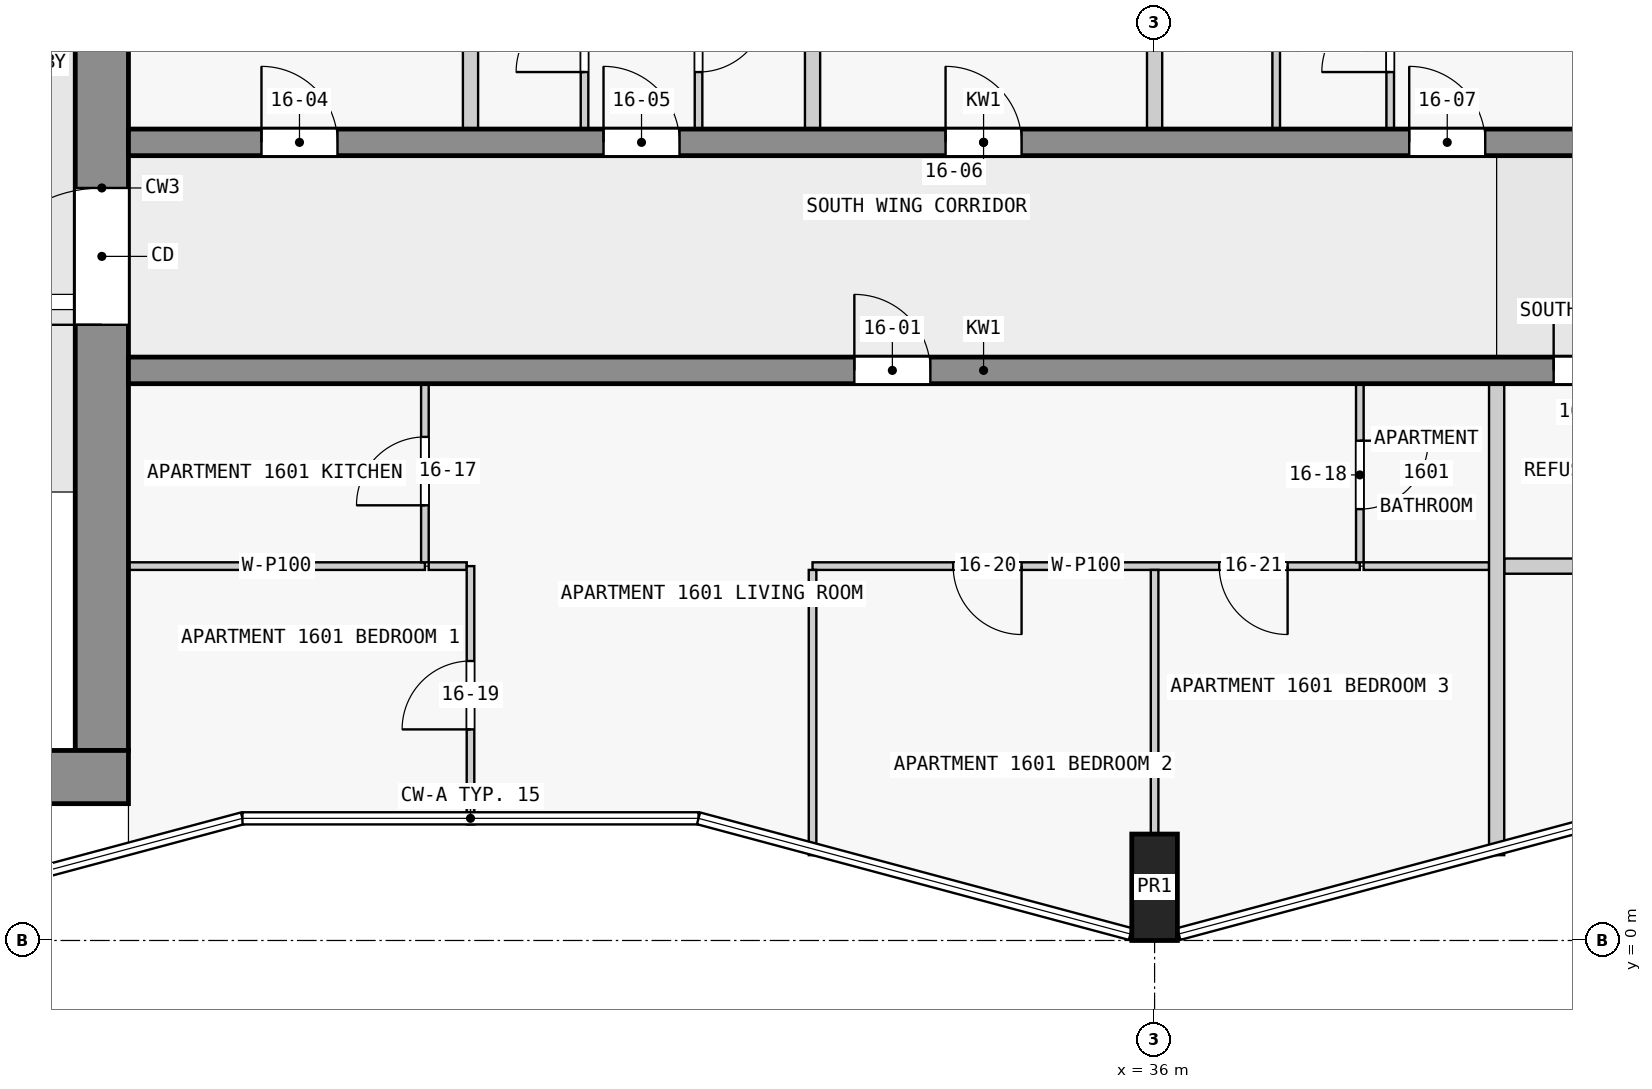
"""IFC4 building model, lengths in metres.
Left out: names, types, materials, properties, quantities, classifications, styles, units other than length and angle.
Written with IfcOpenShell. Run it as: python <this file> out.ifc"""

import sys

from ifc_helpers import new_model, si_unit, direction, frame, frame_2d, origin, origin_2d, place, context, subcontext, project, spatial, rectangle, extrude, element, fill, save


model = new_model("IFC4")
c1 = context("Model", 3, precision=1e-05, world=origin(), true_north=direction((0.0, 1.0)))
c2 = subcontext(c1, "Body", "Model", "MODEL_VIEW")
j1 = project(units=[si_unit("LENGTHUNIT", "METRE"), si_unit("PLANEANGLEUNIT", "RADIAN")], contexts=[c1])
p1 = place(None, origin())
s1 = spatial("IfcSite", under=j1, at=p1, CompositionType="ELEMENT")
p2 = place(p1, origin())
s2 = spatial("IfcBuilding", under=s1, at=p2, CompositionType="ELEMENT")
p3 = place(p2, frame((0.0, 0.0, 65.3)))
s3 = spatial("IfcBuildingStorey", under=s2, at=p3, CompositionType="ELEMENT", Elevation=65.3)
p4 = place(p3, frame((36.0, 0.7, 0.0), z_axis=(0.0, 0.0, 1.0), x_axis=(1.0, 0.0, 0.0)))
e1 = element("IfcColumn", 1, at=p4, inside=s3, PredefinedType="COLUMN", context=c2, shape_type="SweptSolid", body=[
    extrude(rectangle(XDim=0.6, YDim=1.4, at=origin_2d()), origin(), (0.0, 0.0, 1.0), 3.5),
])
p5 = place(p3, frame((1.6, 2.15, 0.0), z_axis=(0.0, 0.0, 1.0), x_axis=(1.0, 0.0, 0.0)))
e2 = element("IfcWall", 2, at=p5, inside=s3, PredefinedType="SHEAR", context=c2, shape_type="SweptSolid", body=[
    extrude(rectangle(XDim=20.9, YDim=0.7, at=frame_2d((10.45, 0.0))), origin(), (0.0, 0.0, 1.0), 3.25),
])
p6 = place(p3, frame((22.15, 2.5, 0.0), z_axis=(0.0, 0.0, 1.0), x_axis=(0.0, 1.0, 0.0)))
e3 = element("IfcWall", 3, at=p6, inside=s3, PredefinedType="SHEAR", context=c2, shape_type="SweptSolid", body=[
    extrude(rectangle(XDim=14.8, YDim=0.7, at=frame_2d((7.4, 0.0))), origin(), (0.0, 0.0, 1.0), 3.25),
])
p7 = place(p6, frame((5.6, 0.0, 0.0)))
e4 = element("IfcOpeningElement", 4, at=p7, cuts=e3, PredefinedType="OPENING", context=c2, shape_type="SweptSolid", body=[
    extrude(rectangle(XDim=1.8, YDim=2.1, at=frame_2d((0.9, 1.05))), frame((0.0, 0.36, 0.0), z_axis=(0.0, -1.0, 0.0), x_axis=(1.0, 0.0, 0.0)), (0.0, 0.0, 1.0), 0.72),
])
p8 = place(p3, frame((22.5, 7.5, 0.0), z_axis=(0.0, 0.0, 1.0), x_axis=(1.0, 0.0, 0.0)))
e5 = element("IfcWall", 5, at=p8, inside=s3, PredefinedType="SHEAR", context=c2, shape_type="SweptSolid", body=[
    extrude(rectangle(XDim=22.5, YDim=0.35, at=frame_2d((11.25, 0.0))), origin(), (0.0, 0.0, 1.0), 3.25),
])
p9 = place(p8, frame((9.55, 0.0, 0.0)))
e6 = element("IfcOpeningElement", 6, at=p9, cuts=e5, PredefinedType="OPENING", context=c2, shape_type="SweptSolid", body=[
    extrude(rectangle(XDim=1.0, YDim=2.1, at=frame_2d((0.5, 1.05))), frame((0.0, 0.185, 0.0), z_axis=(0.0, -1.0, 0.0), x_axis=(1.0, 0.0, 0.0)), (0.0, 0.0, 1.0), 0.37),
])
p10 = place(p8, frame((18.75, 0.0, 0.0)))
e7 = element("IfcOpeningElement", 7, at=p10, cuts=e5, PredefinedType="OPENING", context=c2, shape_type="SweptSolid", body=[
    extrude(rectangle(XDim=0.9, YDim=2.1, at=frame_2d((0.45, 1.05))), frame((0.0, 0.185, 0.0), z_axis=(0.0, -1.0, 0.0), x_axis=(1.0, 0.0, 0.0)), (0.0, 0.0, 1.0), 0.37),
])
p11 = place(p8, frame((20.95, 0.0, 0.0)))
e8 = element("IfcOpeningElement", 8, at=p11, cuts=e5, PredefinedType="OPENING", context=c2, shape_type="SweptSolid", body=[
    extrude(rectangle(XDim=1.0, YDim=2.1, at=frame_2d((0.5, 1.05))), frame((0.0, 0.185, 0.0), z_axis=(0.0, -1.0, 0.0), x_axis=(1.0, 0.0, 0.0)), (0.0, 0.0, 1.0), 0.37),
])
p12 = place(p3, frame((22.5, 10.5, 0.0), z_axis=(0.0, 0.0, 1.0), x_axis=(1.0, 0.0, 0.0)))
e9 = element("IfcWall", 9, at=p12, inside=s3, PredefinedType="SHEAR", context=c2, shape_type="SweptSolid", body=[
    extrude(rectangle(XDim=22.5, YDim=0.35, at=frame_2d((11.25, 0.0))), origin(), (0.0, 0.0, 1.0), 3.25),
])
p13 = place(p12, frame((1.75, 0.0, 0.0)))
e10 = element("IfcOpeningElement", 10, at=p13, cuts=e9, PredefinedType="OPENING", context=c2, shape_type="SweptSolid", body=[
    extrude(rectangle(XDim=1.0, YDim=2.1, at=frame_2d((0.5, 1.05))), frame((0.0, 0.185, 0.0), z_axis=(0.0, -1.0, 0.0), x_axis=(1.0, 0.0, 0.0)), (0.0, 0.0, 1.0), 0.37),
])
p14 = place(p12, frame((6.25, 0.0, 0.0)))
e11 = element("IfcOpeningElement", 11, at=p14, cuts=e9, PredefinedType="OPENING", context=c2, shape_type="SweptSolid", body=[
    extrude(rectangle(XDim=1.0, YDim=2.1, at=frame_2d((0.5, 1.05))), frame((0.0, 0.185, 0.0), z_axis=(0.0, -1.0, 0.0), x_axis=(1.0, 0.0, 0.0)), (0.0, 0.0, 1.0), 0.37),
])
p15 = place(p12, frame((10.75, 0.0, 0.0)))
e12 = element("IfcOpeningElement", 12, at=p15, cuts=e9, PredefinedType="OPENING", context=c2, shape_type="SweptSolid", body=[
    extrude(rectangle(XDim=1.0, YDim=2.1, at=frame_2d((0.5, 1.05))), frame((0.0, 0.185, 0.0), z_axis=(0.0, -1.0, 0.0), x_axis=(1.0, 0.0, 0.0)), (0.0, 0.0, 1.0), 0.37),
])
p16 = place(p12, frame((16.85, 0.0, 0.0)))
e13 = element("IfcOpeningElement", 13, at=p16, cuts=e9, PredefinedType="OPENING", context=c2, shape_type="SweptSolid", body=[
    extrude(rectangle(XDim=1.0, YDim=2.1, at=frame_2d((0.5, 1.05))), frame((0.0, 0.185, 0.0), z_axis=(0.0, -1.0, 0.0), x_axis=(1.0, 0.0, 0.0)), (0.0, 0.0, 1.0), 0.37),
])
p17 = place(p3, frame((26.95, 4.925, 0.0), z_axis=(0.0, 0.0, 1.0), x_axis=(-1.0, 0.0, 0.0)))
e14 = element("IfcWall", 14, at=p17, inside=s3, PredefinedType="PARTITIONING", context=c2, shape_type="SweptSolid", body=[
    extrude(rectangle(XDim=0.5, YDim=0.1, at=frame_2d((0.25, 0.0))), origin(), (0.0, 0.0, 1.0), 3.25),
])
p18 = place(p3, frame((38.7, 4.925, 0.0), z_axis=(0.0, 0.0, 1.0), x_axis=(-1.0, 0.0, 0.0)))
e15 = element("IfcWall", 15, at=p18, inside=s3, PredefinedType="PARTITIONING", context=c2, shape_type="SweptSolid", body=[
    extrude(rectangle(XDim=7.2, YDim=0.1, at=frame_2d((3.6, 0.0))), origin(), (0.0, 0.0, 1.0), 3.25),
])
p19 = place(p18, frame((4.45, 0.0, 0.0)))
e16 = element("IfcOpeningElement", 16, at=p19, cuts=e15, PredefinedType="OPENING", context=c2, shape_type="SweptSolid", body=[
    extrude(rectangle(XDim=0.9, YDim=2.1, at=frame_2d((0.45, 1.05))), frame((0.0, 0.06, 0.0), z_axis=(0.0, -1.0, 0.0), x_axis=(1.0, 0.0, 0.0)), (0.0, 0.0, 1.0), 0.12),
])
p20 = place(p18, frame((0.95, 0.0, 0.0)))
e17 = element("IfcOpeningElement", 17, at=p20, cuts=e15, PredefinedType="OPENING", context=c2, shape_type="SweptSolid", body=[
    extrude(rectangle(XDim=0.9, YDim=2.1, at=frame_2d((0.45, 1.05))), frame((0.0, 0.06, 0.0), z_axis=(0.0, -1.0, 0.0), x_axis=(1.0, 0.0, 0.0)), (0.0, 0.0, 1.0), 0.12),
])
p21 = place(p3, frame((22.5, 4.925, 0.0), z_axis=(0.0, 0.0, 1.0), x_axis=(1.0, 0.0, 0.0)))
e18 = element("IfcWall", 18, at=p21, inside=s3, PredefinedType="PARTITIONING", context=c2, shape_type="SweptSolid", body=[
    extrude(rectangle(XDim=3.9, YDim=0.1, at=frame_2d((1.95, 0.0))), origin(), (0.0, 0.0, 1.0), 3.25),
])
p22 = place(p3, frame((38.75, 4.925, 0.0), z_axis=(0.0, 0.0, 1.0), x_axis=(1.0, 0.0, 0.0)))
e19 = element("IfcWall", 19, at=p22, inside=s3, PredefinedType="PARTITIONING", context=c2, shape_type="SweptSolid", body=[
    extrude(rectangle(XDim=1.65, YDim=0.1, at=frame_2d((0.825, 0.0))), origin(), (0.0, 0.0, 1.0), 3.25),
])
p23 = place(p3, frame((40.6, 4.925, 0.0), z_axis=(0.0, 0.0, 1.0), x_axis=(1.0, 0.0, 0.0)))
e20 = element("IfcWall", 20, at=p23, inside=s3, PredefinedType="PARTITIONING", context=c2, shape_type="SweptSolid", body=[
    extrude(rectangle(XDim=2.3, YDim=0.2, at=frame_2d((1.15, 0.0))), origin(), (0.0, 0.0, 1.0), 3.25),
])
p24 = place(p3, frame((26.4, 4.975, 0.0), z_axis=(0.0, 0.0, 1.0), x_axis=(0.0, 1.0, 0.0)))
e21 = element("IfcWall", 21, at=p24, inside=s3, PredefinedType="PARTITIONING", context=c2, shape_type="SweptSolid", body=[
    extrude(rectangle(XDim=2.35, YDim=0.1, at=frame_2d((1.175, 0.0))), origin(), (0.0, 0.0, 1.0), 3.25),
])
p25 = place(p24, frame((0.75, 0.0, 0.0)))
e22 = element("IfcOpeningElement", 22, at=p25, cuts=e21, PredefinedType="OPENING", context=c2, shape_type="SweptSolid", body=[
    extrude(rectangle(XDim=0.9, YDim=2.1, at=frame_2d((0.45, 1.05))), frame((0.0, 0.06, 0.0), z_axis=(0.0, -1.0, 0.0), x_axis=(1.0, 0.0, 0.0)), (0.0, 0.0, 1.0), 0.12),
])
p26 = place(p3, frame((27.0, 1.527, 0.0), z_axis=(0.0, 0.0, 1.0), x_axis=(0.0, 1.0, 0.0)))
e23 = element("IfcWall", 23, at=p26, inside=s3, PredefinedType="PARTITIONING", context=c2, shape_type="SweptSolid", body=[
    extrude(rectangle(XDim=3.398, YDim=0.1, at=frame_2d((1.699, 0.0))), origin(), (0.0, 0.0, 1.0), 3.25),
])
p27 = place(p26, frame((1.25, 0.0, 0.0)))
e24 = element("IfcOpeningElement", 24, at=p27, cuts=e23, PredefinedType="OPENING", context=c2, shape_type="SweptSolid", body=[
    extrude(rectangle(XDim=0.9, YDim=2.1, at=frame_2d((0.45, 1.05))), frame((0.0, 0.06, 0.0), z_axis=(0.0, -1.0, 0.0), x_axis=(1.0, 0.0, 0.0)), (0.0, 0.0, 1.0), 0.12),
])
p28 = place(p3, frame((27.0, 10.675, 0.0), z_axis=(0.0, 0.0, 1.0), x_axis=(0.0, 1.0, 0.0)))
e25 = element("IfcWall", 25, at=p28, inside=s3, PredefinedType="PARTITIONING", context=c2, shape_type="SweptSolid", body=[
    extrude(rectangle(XDim=5.798, YDim=0.2, at=frame_2d((2.899, 0.0))), origin(), (0.0, 0.0, 1.0), 3.25),
])
p29 = place(p3, frame((28.5, 10.675, 0.0), z_axis=(0.0, 0.0, 1.0), x_axis=(0.0, 1.0, 0.0)))
e26 = element("IfcWall", 26, at=p29, inside=s3, PredefinedType="PARTITIONING", context=c2, shape_type="SweptSolid", body=[
    extrude(rectangle(XDim=2.4, YDim=0.1, at=frame_2d((1.2, 0.0))), origin(), (0.0, 0.0, 1.0), 3.25),
])
p30 = place(p29, frame((0.75, 0.0, 0.0)))
e27 = element("IfcOpeningElement", 27, at=p30, cuts=e26, PredefinedType="OPENING", context=c2, shape_type="SweptSolid", body=[
    extrude(rectangle(XDim=0.9, YDim=2.1, at=frame_2d((0.45, 1.05))), frame((0.0, 0.06, 0.0), z_axis=(0.0, -1.0, 0.0), x_axis=(1.0, 0.0, 0.0)), (0.0, 0.0, 1.0), 0.12),
])
p31 = place(p3, frame((30.0, 13.075, 0.0), z_axis=(0.0, 0.0, 1.0), x_axis=(0.0, -1.0, 0.0)))
e28 = element("IfcWall", 28, at=p31, inside=s3, PredefinedType="PARTITIONING", context=c2, shape_type="SweptSolid", body=[
    extrude(rectangle(XDim=2.4, YDim=0.1, at=frame_2d((1.2, 0.0))), origin(), (0.0, 0.0, 1.0), 3.25),
])
p32 = place(p31, frame((0.75, 0.0, 0.0)))
e29 = element("IfcOpeningElement", 29, at=p32, cuts=e28, PredefinedType="OPENING", context=c2, shape_type="SweptSolid", body=[
    extrude(rectangle(XDim=0.9, YDim=2.1, at=frame_2d((0.45, 1.05))), frame((0.0, 0.06, 0.0), z_axis=(0.0, -1.0, 0.0), x_axis=(1.0, 0.0, 0.0)), (0.0, 0.0, 1.0), 0.12),
])
p33 = place(p3, frame((31.5, 4.875, 0.0), z_axis=(0.0, 0.0, 1.0), x_axis=(0.0, -1.0, 0.0)))
e30 = element("IfcWall", 30, at=p33, inside=s3, PredefinedType="PARTITIONING", context=c2, shape_type="SweptSolid", body=[
    extrude(rectangle(XDim=3.753, YDim=0.1, at=frame_2d((1.876, 0.0))), origin(), (0.0, 0.0, 1.0), 3.25),
])
p34 = place(p3, frame((31.5, 10.675, 0.0), z_axis=(0.0, 0.0, 1.0), x_axis=(0.0, 1.0, 0.0)))
e31 = element("IfcWall", 31, at=p34, inside=s3, PredefinedType="PARTITIONING", context=c2, shape_type="SweptSolid", body=[
    extrude(rectangle(XDim=2.3, YDim=0.2, at=frame_2d((1.15, 0.0))), origin(), (0.0, 0.0, 1.0), 3.25),
])
p35 = place(p3, frame((36.0, 1.4, 0.0), z_axis=(0.0, 0.0, 1.0), x_axis=(0.0, 1.0, 0.0)))
e32 = element("IfcWall", 32, at=p35, inside=s3, PredefinedType="PARTITIONING", context=c2, shape_type="SweptSolid", body=[
    extrude(rectangle(XDim=3.475, YDim=0.1, at=frame_2d((1.738, 0.0))), origin(), (0.0, 0.0, 1.0), 3.25),
])
p36 = place(p3, frame((36.0, 10.675, 0.0), z_axis=(0.0, 0.0, 1.0), x_axis=(0.0, 1.0, 0.0)))
e33 = element("IfcWall", 33, at=p36, inside=s3, PredefinedType="PARTITIONING", context=c2, shape_type="SweptSolid", body=[
    extrude(rectangle(XDim=5.925, YDim=0.2, at=frame_2d((2.962, 0.0))), origin(), (0.0, 0.0, 1.0), 3.25),
])
p37 = place(p3, frame((37.6, 10.675, 0.0), z_axis=(0.0, 0.0, 1.0), x_axis=(0.0, 1.0, 0.0)))
e34 = element("IfcWall", 34, at=p37, inside=s3, PredefinedType="PARTITIONING", context=c2, shape_type="SweptSolid", body=[
    extrude(rectangle(XDim=2.35, YDim=0.1, at=frame_2d((1.175, 0.0))), origin(), (0.0, 0.0, 1.0), 3.25),
])
p38 = place(p3, frame((38.7, 7.325, 0.0), z_axis=(0.0, 0.0, 1.0), x_axis=(0.0, -1.0, 0.0)))
e35 = element("IfcWall", 35, at=p38, inside=s3, PredefinedType="PARTITIONING", context=c2, shape_type="SweptSolid", body=[
    extrude(rectangle(XDim=2.35, YDim=0.1, at=frame_2d((1.175, 0.0))), origin(), (0.0, 0.0, 1.0), 3.25),
])
p39 = place(p38, frame((0.75, 0.0, 0.0)))
e36 = element("IfcOpeningElement", 36, at=p39, cuts=e35, PredefinedType="OPENING", context=c2, shape_type="SweptSolid", body=[
    extrude(rectangle(XDim=0.9, YDim=2.1, at=frame_2d((0.45, 1.05))), frame((0.0, 0.06, 0.0), z_axis=(0.0, -1.0, 0.0), x_axis=(1.0, 0.0, 0.0)), (0.0, 0.0, 1.0), 0.12),
])
p40 = place(p3, frame((39.1, 10.675, 0.0), z_axis=(0.0, 0.0, 1.0), x_axis=(0.0, 1.0, 0.0)))
e37 = element("IfcWall", 37, at=p40, inside=s3, PredefinedType="PARTITIONING", context=c2, shape_type="SweptSolid", body=[
    extrude(rectangle(XDim=2.35, YDim=0.1, at=frame_2d((1.175, 0.0))), origin(), (0.0, 0.0, 1.0), 3.25),
])
p41 = place(p40, frame((0.75, 0.0, 0.0)))
e38 = element("IfcOpeningElement", 38, at=p41, cuts=e37, PredefinedType="OPENING", context=c2, shape_type="SweptSolid", body=[
    extrude(rectangle(XDim=0.9, YDim=2.1, at=frame_2d((0.45, 1.05))), frame((0.0, 0.06, 0.0), z_axis=(0.0, -1.0, 0.0), x_axis=(1.0, 0.0, 0.0)), (0.0, 0.0, 1.0), 0.12),
])
p42 = place(p3, frame((40.5, 1.122, 0.0), z_axis=(0.0, 0.0, 1.0), x_axis=(0.0, 1.0, 0.0)))
e39 = element("IfcWall", 39, at=p42, inside=s3, PredefinedType="PARTITIONING", context=c2, shape_type="SweptSolid", body=[
    extrude(rectangle(XDim=6.203, YDim=0.2, at=frame_2d((3.101, 0.0))), origin(), (0.0, 0.0, 1.0), 3.25),
])
p43 = place(p7, origin())
e40 = element("IfcDoor", 40, at=p43, inside=s3, OperationType="DOUBLE_DOOR_SINGLE_SWING", PredefinedType="DOOR", context=c2, shape_type="SweptSolid", body=[
    extrude(rectangle(XDim=1.8, YDim=2.1, at=frame_2d((0.9, 1.05))), frame((0.0, 0.025, 0.0), z_axis=(0.0, -1.0, 0.0), x_axis=(1.0, 0.0, 0.0)), (0.0, 0.0, 1.0), 0.05),
])
fill(e4, e40)
p44 = place(p9, origin())
e41 = element("IfcDoor", 41, at=p44, inside=s3, OperationType="SINGLE_SWING_LEFT", PredefinedType="DOOR", context=c2, shape_type="SweptSolid", body=[
    extrude(rectangle(XDim=1.0, YDim=2.1, at=frame_2d((0.5, 1.05))), frame((0.0, 0.025, 0.0), z_axis=(0.0, -1.0, 0.0), x_axis=(1.0, 0.0, 0.0)), (0.0, 0.0, 1.0), 0.05),
])
fill(e6, e41)
p45 = place(p10, origin())
e42 = element("IfcDoor", 42, at=p45, inside=s3, OperationType="SINGLE_SWING_RIGHT", PredefinedType="DOOR", context=c2, shape_type="SweptSolid", body=[
    extrude(rectangle(XDim=0.9, YDim=2.1, at=frame_2d((0.45, 1.05))), frame((0.0, 0.025, 0.0), z_axis=(0.0, -1.0, 0.0), x_axis=(1.0, 0.0, 0.0)), (0.0, 0.0, 1.0), 0.05),
])
fill(e7, e42)
p46 = place(p13, origin())
e43 = element("IfcDoor", 43, at=p46, inside=s3, OperationType="SINGLE_SWING_LEFT", PredefinedType="DOOR", context=c2, shape_type="SweptSolid", body=[
    extrude(rectangle(XDim=1.0, YDim=2.1, at=frame_2d((0.5, 1.05))), frame((0.0, 0.025, 0.0), z_axis=(0.0, -1.0, 0.0), x_axis=(1.0, 0.0, 0.0)), (0.0, 0.0, 1.0), 0.05),
])
fill(e10, e43)
p47 = place(p14, origin())
e44 = element("IfcDoor", 44, at=p47, inside=s3, OperationType="SINGLE_SWING_LEFT", PredefinedType="DOOR", context=c2, shape_type="SweptSolid", body=[
    extrude(rectangle(XDim=1.0, YDim=2.1, at=frame_2d((0.5, 1.05))), frame((0.0, 0.025, 0.0), z_axis=(0.0, -1.0, 0.0), x_axis=(1.0, 0.0, 0.0)), (0.0, 0.0, 1.0), 0.05),
])
fill(e11, e44)
p48 = place(p15, origin())
e45 = element("IfcDoor", 45, at=p48, inside=s3, OperationType="SINGLE_SWING_LEFT", PredefinedType="DOOR", context=c2, shape_type="SweptSolid", body=[
    extrude(rectangle(XDim=1.0, YDim=2.1, at=frame_2d((0.5, 1.05))), frame((0.0, 0.025, 0.0), z_axis=(0.0, -1.0, 0.0), x_axis=(1.0, 0.0, 0.0)), (0.0, 0.0, 1.0), 0.05),
])
fill(e12, e45)
p49 = place(p16, origin())
e46 = element("IfcDoor", 46, at=p49, inside=s3, OperationType="SINGLE_SWING_RIGHT", PredefinedType="DOOR", context=c2, shape_type="SweptSolid", body=[
    extrude(rectangle(XDim=1.0, YDim=2.1, at=frame_2d((0.5, 1.05))), frame((0.0, 0.025, 0.0), z_axis=(0.0, -1.0, 0.0), x_axis=(1.0, 0.0, 0.0)), (0.0, 0.0, 1.0), 0.05),
])
fill(e13, e46)
p50 = place(p25, origin())
e47 = element("IfcDoor", 47, at=p50, inside=s3, OperationType="SINGLE_SWING_RIGHT", PredefinedType="DOOR", context=c2, shape_type="SweptSolid", body=[
    extrude(rectangle(XDim=0.9, YDim=2.1, at=frame_2d((0.45, 1.05))), frame((0.0, 0.025, 0.0), z_axis=(0.0, -1.0, 0.0), x_axis=(1.0, 0.0, 0.0)), (0.0, 0.0, 1.0), 0.05),
])
fill(e22, e47)
p51 = place(p39, origin())
e48 = element("IfcDoor", 48, at=p51, inside=s3, OperationType="SINGLE_SWING_RIGHT", PredefinedType="DOOR", context=c2, shape_type="SweptSolid", body=[
    extrude(rectangle(XDim=0.9, YDim=2.1, at=frame_2d((0.45, 1.05))), frame((0.0, 0.025, 0.0), z_axis=(0.0, -1.0, 0.0), x_axis=(1.0, 0.0, 0.0)), (0.0, 0.0, 1.0), 0.05),
])
fill(e36, e48)
p52 = place(p27, origin())
e49 = element("IfcDoor", 49, at=p52, inside=s3, OperationType="SINGLE_SWING_RIGHT", PredefinedType="DOOR", context=c2, shape_type="SweptSolid", body=[
    extrude(rectangle(XDim=0.9, YDim=2.1, at=frame_2d((0.45, 1.05))), frame((0.0, 0.025, 0.0), z_axis=(0.0, -1.0, 0.0), x_axis=(1.0, 0.0, 0.0)), (0.0, 0.0, 1.0), 0.05),
])
fill(e24, e49)
p53 = place(p19, origin())
e50 = element("IfcDoor", 50, at=p53, inside=s3, OperationType="SINGLE_SWING_RIGHT", PredefinedType="DOOR", context=c2, shape_type="SweptSolid", body=[
    extrude(rectangle(XDim=0.9, YDim=2.1, at=frame_2d((0.45, 1.05))), frame((0.0, 0.025, 0.0), z_axis=(0.0, -1.0, 0.0), x_axis=(1.0, 0.0, 0.0)), (0.0, 0.0, 1.0), 0.05),
])
fill(e16, e50)
p54 = place(p20, origin())
e51 = element("IfcDoor", 51, at=p54, inside=s3, OperationType="SINGLE_SWING_LEFT", PredefinedType="DOOR", context=c2, shape_type="SweptSolid", body=[
    extrude(rectangle(XDim=0.9, YDim=2.1, at=frame_2d((0.45, 1.05))), frame((0.0, 0.025, 0.0), z_axis=(0.0, -1.0, 0.0), x_axis=(1.0, 0.0, 0.0)), (0.0, 0.0, 1.0), 0.05),
])
fill(e17, e51)
p55 = place(p30, origin())
e52 = element("IfcDoor", 52, at=p55, inside=s3, OperationType="SINGLE_SWING_RIGHT", PredefinedType="DOOR", context=c2, shape_type="SweptSolid", body=[
    extrude(rectangle(XDim=0.9, YDim=2.1, at=frame_2d((0.45, 1.05))), frame((0.0, 0.025, 0.0), z_axis=(0.0, -1.0, 0.0), x_axis=(1.0, 0.0, 0.0)), (0.0, 0.0, 1.0), 0.05),
])
fill(e27, e52)
p56 = place(p32, origin())
e53 = element("IfcDoor", 53, at=p56, inside=s3, OperationType="SINGLE_SWING_RIGHT", PredefinedType="DOOR", context=c2, shape_type="SweptSolid", body=[
    extrude(rectangle(XDim=0.9, YDim=2.1, at=frame_2d((0.45, 1.05))), frame((0.0, 0.025, 0.0), z_axis=(0.0, -1.0, 0.0), x_axis=(1.0, 0.0, 0.0)), (0.0, 0.0, 1.0), 0.05),
])
fill(e29, e53)
p57 = place(p41, origin())
e54 = element("IfcDoor", 54, at=p57, inside=s3, OperationType="SINGLE_SWING_RIGHT", PredefinedType="DOOR", context=c2, shape_type="SweptSolid", body=[
    extrude(rectangle(XDim=0.9, YDim=2.1, at=frame_2d((0.45, 1.05))), frame((0.0, 0.025, 0.0), z_axis=(0.0, -1.0, 0.0), x_axis=(1.0, 0.0, 0.0)), (0.0, 0.0, 1.0), 0.05),
])
fill(e38, e54)
save(model, sys.argv[1])
